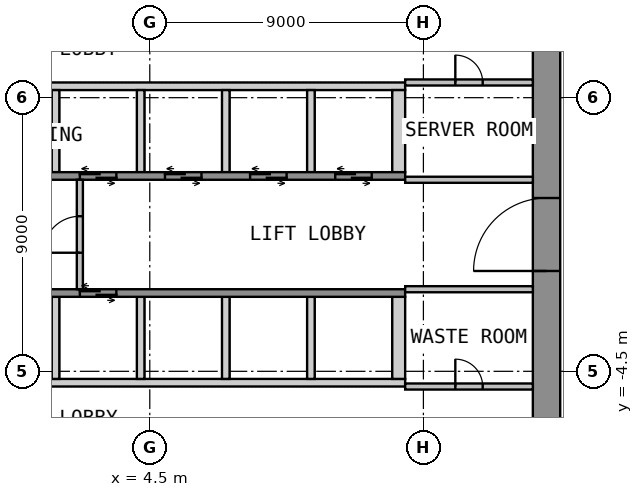
"""IFC4 building model, lengths in metres.
Left out: names, types, materials, properties, quantities, classifications, styles, units other than length and angle.
Written with IfcOpenShell. Run it as: python <this file> out.ifc"""

import sys

from ifc_helpers import new_model, si_unit, direction, frame, frame_2d, origin, place, context, subcontext, project, spatial, polyline, rectangle, outline, extrude, element, fill, save


model = new_model("IFC4")
c1 = context("Model", 3, precision=1e-05, world=origin(), true_north=direction((0.0, 1.0)))
c2 = subcontext(c1, "Body", "Model", "MODEL_VIEW")
j1 = project(units=[si_unit("LENGTHUNIT", "METRE"), si_unit("PLANEANGLEUNIT", "RADIAN")], contexts=[c1])
p1 = place(None, origin())
s1 = spatial("IfcSite", under=j1, at=p1, CompositionType="ELEMENT")
p2 = place(p1, origin())
s2 = spatial("IfcBuilding", under=s1, at=p2, CompositionType="ELEMENT")
p3 = place(p2, frame((0.0, 0.0, 10.8)))
s3 = spatial("IfcBuildingStorey", under=s2, at=p3, CompositionType="ELEMENT", Elevation=10.8)
p4 = place(p3, frame((17.55, -12.6, 0.0), z_axis=(0.0, 0.0, 1.0), x_axis=(0.0, 1.0, 0.0)))
e1 = element("IfcWall", 1, at=p4, inside=s3, PredefinedType="SHEAR", context=c2, shape_type="SweptSolid", body=[
    extrude(rectangle(XDim=25.2, YDim=0.9, at=frame_2d((12.6, 0.0))), origin(), (0.0, 0.0, 1.0), 4.4),
])
p5 = place(p4, frame((11.4, 0.0, 0.0)))
e2 = element("IfcOpeningElement", 2, at=p5, cuts=e1, PredefinedType="OPENING", context=c2, shape_type="SweptSolid", body=[
    extrude(rectangle(XDim=2.4, YDim=2.1, at=frame_2d((1.2, 1.05))), frame((0.0, 0.46, 0.0), z_axis=(0.0, -1.0, 0.0), x_axis=(1.0, 0.0, 0.0)), (0.0, 0.0, 1.0), 0.92),
])
p6 = place(p3, origin())
e3 = element("IfcWall", 3, at=p6, inside=s3, PredefinedType="SHEAR", context=c2, shape_type="SweptSolid", body=[
    extrude(outline(polyline([(-12.9, 4.75), (12.9, 4.75), (12.9, 5.0), (-12.9, 5.0), (-12.9, 4.75)])), origin(), (0.0, 0.0, 1.0), 4.4),
])
p7 = place(p3, origin())
e4 = element("IfcWall", 4, at=p7, inside=s3, PredefinedType="SHEAR", context=c2, shape_type="SweptSolid", body=[
    extrude(outline(polyline([(1.275, 2.05), (1.525, 2.05), (1.525, 4.75), (1.275, 4.75), (1.275, 2.05)])), origin(), (0.0, 0.0, 1.0), 4.4),
])
p8 = place(p3, origin())
e5 = element("IfcWall", 5, at=p8, inside=s3, PredefinedType="SHEAR", context=c2, shape_type="SweptSolid", body=[
    extrude(outline(polyline([(4.075, 2.05), (4.325, 2.05), (4.325, 4.75), (4.075, 4.75), (4.075, 2.05)])), origin(), (0.0, 0.0, 1.0), 4.4),
])
p9 = place(p3, origin())
e6 = element("IfcWall", 6, at=p9, inside=s3, PredefinedType="SHEAR", context=c2, shape_type="SweptSolid", body=[
    extrude(outline(polyline([(6.875, 2.05), (7.125, 2.05), (7.125, 4.75), (6.875, 4.75), (6.875, 2.05)])), origin(), (0.0, 0.0, 1.0), 4.4),
])
p10 = place(p3, origin())
e7 = element("IfcWall", 7, at=p10, inside=s3, PredefinedType="SHEAR", context=c2, shape_type="SweptSolid", body=[
    extrude(outline(polyline([(9.675, 2.05), (9.925, 2.05), (9.925, 4.75), (9.675, 4.75), (9.675, 2.05)])), origin(), (0.0, 0.0, 1.0), 4.4),
])
p11 = place(p3, origin())
e8 = element("IfcWall", 8, at=p11, inside=s3, PredefinedType="SHEAR", context=c2, shape_type="SweptSolid", body=[
    extrude(outline(polyline([(12.475, 2.05), (12.9, 2.05), (12.9, 4.75), (12.475, 4.75), (12.475, 2.05)])), origin(), (0.0, 0.0, 1.0), 4.4),
])
p12 = place(p3, frame((-12.9, 1.925, 0.0), z_axis=(0.0, 0.0, 1.0), x_axis=(1.0, 0.0, 0.0)))
e9 = element("IfcWall", 9, at=p12, inside=s3, PredefinedType="SHEAR", context=c2, shape_type="SweptSolid", body=[
    extrude(rectangle(XDim=25.8, YDim=0.25, at=frame_2d((12.9, 0.0))), origin(), (0.0, 0.0, 1.0), 4.4),
])
p13 = place(p12, frame((9.5, 0.0, 0.0)))
e10 = element("IfcOpeningElement", 10, at=p13, cuts=e9, PredefinedType="OPENING", context=c2, shape_type="SweptSolid", body=[
    extrude(rectangle(XDim=1.2, YDim=2.1, at=frame_2d((0.6, 1.05))), frame((0.0, 0.135, 0.0), z_axis=(0.0, -1.0, 0.0), x_axis=(1.0, 0.0, 0.0)), (0.0, 0.0, 1.0), 0.27),
])
p14 = place(p12, frame((12.3, 0.0, 0.0)))
e11 = element("IfcOpeningElement", 11, at=p14, cuts=e9, PredefinedType="OPENING", context=c2, shape_type="SweptSolid", body=[
    extrude(rectangle(XDim=1.2, YDim=2.1, at=frame_2d((0.6, 1.05))), frame((0.0, 0.135, 0.0), z_axis=(0.0, -1.0, 0.0), x_axis=(1.0, 0.0, 0.0)), (0.0, 0.0, 1.0), 0.27),
])
p15 = place(p12, frame((15.1, 0.0, 0.0)))
e12 = element("IfcOpeningElement", 12, at=p15, cuts=e9, PredefinedType="OPENING", context=c2, shape_type="SweptSolid", body=[
    extrude(rectangle(XDim=1.2, YDim=2.1, at=frame_2d((0.6, 1.05))), frame((0.0, 0.135, 0.0), z_axis=(0.0, -1.0, 0.0), x_axis=(1.0, 0.0, 0.0)), (0.0, 0.0, 1.0), 0.27),
])
p16 = place(p12, frame((17.9, 0.0, 0.0)))
e13 = element("IfcOpeningElement", 13, at=p16, cuts=e9, PredefinedType="OPENING", context=c2, shape_type="SweptSolid", body=[
    extrude(rectangle(XDim=1.2, YDim=2.1, at=frame_2d((0.6, 1.05))), frame((0.0, 0.135, 0.0), z_axis=(0.0, -1.0, 0.0), x_axis=(1.0, 0.0, 0.0)), (0.0, 0.0, 1.0), 0.27),
])
p17 = place(p12, frame((20.7, 0.0, 0.0)))
e14 = element("IfcOpeningElement", 14, at=p17, cuts=e9, PredefinedType="OPENING", context=c2, shape_type="SweptSolid", body=[
    extrude(rectangle(XDim=1.2, YDim=2.1, at=frame_2d((0.6, 1.05))), frame((0.0, 0.135, 0.0), z_axis=(0.0, -1.0, 0.0), x_axis=(1.0, 0.0, 0.0)), (0.0, 0.0, 1.0), 0.27),
])
p18 = place(p12, frame((23.5, 0.0, 0.0)))
e15 = element("IfcOpeningElement", 15, at=p18, cuts=e9, PredefinedType="OPENING", context=c2, shape_type="SweptSolid", body=[
    extrude(rectangle(XDim=1.2, YDim=2.1, at=frame_2d((0.6, 1.05))), frame((0.0, 0.135, 0.0), z_axis=(0.0, -1.0, 0.0), x_axis=(1.0, 0.0, 0.0)), (0.0, 0.0, 1.0), 0.27),
])
p19 = place(p3, origin())
e16 = element("IfcWall", 16, at=p19, inside=s3, PredefinedType="SHEAR", context=c2, shape_type="SweptSolid", body=[
    extrude(outline(polyline([(-12.9, -5.0), (12.9, -5.0), (12.9, -4.75), (-12.9, -4.75), (-12.9, -5.0)])), origin(), (0.0, 0.0, 1.0), 4.4),
])
p20 = place(p3, origin())
e17 = element("IfcWall", 17, at=p20, inside=s3, PredefinedType="SHEAR", context=c2, shape_type="SweptSolid", body=[
    extrude(outline(polyline([(1.275, -4.75), (1.525, -4.75), (1.525, -2.05), (1.275, -2.05), (1.275, -4.75)])), origin(), (0.0, 0.0, 1.0), 4.4),
])
p21 = place(p3, origin())
e18 = element("IfcWall", 18, at=p21, inside=s3, PredefinedType="SHEAR", context=c2, shape_type="SweptSolid", body=[
    extrude(outline(polyline([(4.075, -4.75), (4.325, -4.75), (4.325, -2.05), (4.075, -2.05), (4.075, -4.75)])), origin(), (0.0, 0.0, 1.0), 4.4),
])
p22 = place(p3, origin())
e19 = element("IfcWall", 19, at=p22, inside=s3, PredefinedType="SHEAR", context=c2, shape_type="SweptSolid", body=[
    extrude(outline(polyline([(6.875, -4.75), (7.125, -4.75), (7.125, -2.05), (6.875, -2.05), (6.875, -4.75)])), origin(), (0.0, 0.0, 1.0), 4.4),
])
p23 = place(p3, origin())
e20 = element("IfcWall", 20, at=p23, inside=s3, PredefinedType="SHEAR", context=c2, shape_type="SweptSolid", body=[
    extrude(outline(polyline([(9.675, -4.75), (9.925, -4.75), (9.925, -2.05), (9.675, -2.05), (9.675, -4.75)])), origin(), (0.0, 0.0, 1.0), 4.4),
])
p24 = place(p3, origin())
e21 = element("IfcWall", 21, at=p24, inside=s3, PredefinedType="SHEAR", context=c2, shape_type="SweptSolid", body=[
    extrude(outline(polyline([(12.475, -4.75), (12.9, -4.75), (12.9, -2.05), (12.475, -2.05), (12.475, -4.75)])), origin(), (0.0, 0.0, 1.0), 4.4),
])
p25 = place(p3, frame((-12.9, -1.925, 0.0), z_axis=(0.0, 0.0, 1.0), x_axis=(1.0, 0.0, 0.0)))
e22 = element("IfcWall", 22, at=p25, inside=s3, PredefinedType="SHEAR", context=c2, shape_type="SweptSolid", body=[
    extrude(rectangle(XDim=25.8, YDim=0.25, at=frame_2d((12.9, 0.0))), origin(), (0.0, 0.0, 1.0), 4.4),
])
p26 = place(p25, frame((1.1, 0.0, 0.0)))
e23 = element("IfcOpeningElement", 23, at=p26, cuts=e22, PredefinedType="OPENING", context=c2, shape_type="SweptSolid", body=[
    extrude(rectangle(XDim=1.2, YDim=2.1, at=frame_2d((0.6, 1.05))), frame((0.0, 0.135, 0.0), z_axis=(0.0, -1.0, 0.0), x_axis=(1.0, 0.0, 0.0)), (0.0, 0.0, 1.0), 0.27),
])
p27 = place(p25, frame((3.9, 0.0, 0.0)))
e24 = element("IfcOpeningElement", 24, at=p27, cuts=e22, PredefinedType="OPENING", context=c2, shape_type="SweptSolid", body=[
    extrude(rectangle(XDim=1.2, YDim=2.1, at=frame_2d((0.6, 1.05))), frame((0.0, 0.135, 0.0), z_axis=(0.0, -1.0, 0.0), x_axis=(1.0, 0.0, 0.0)), (0.0, 0.0, 1.0), 0.27),
])
p28 = place(p25, frame((6.7, 0.0, 0.0)))
e25 = element("IfcOpeningElement", 25, at=p28, cuts=e22, PredefinedType="OPENING", context=c2, shape_type="SweptSolid", body=[
    extrude(rectangle(XDim=1.2, YDim=2.1, at=frame_2d((0.6, 1.05))), frame((0.0, 0.135, 0.0), z_axis=(0.0, -1.0, 0.0), x_axis=(1.0, 0.0, 0.0)), (0.0, 0.0, 1.0), 0.27),
])
p29 = place(p25, frame((9.5, 0.0, 0.0)))
e26 = element("IfcOpeningElement", 26, at=p29, cuts=e22, PredefinedType="OPENING", context=c2, shape_type="SweptSolid", body=[
    extrude(rectangle(XDim=1.2, YDim=2.1, at=frame_2d((0.6, 1.05))), frame((0.0, 0.135, 0.0), z_axis=(0.0, -1.0, 0.0), x_axis=(1.0, 0.0, 0.0)), (0.0, 0.0, 1.0), 0.27),
])
p30 = place(p25, frame((12.3, 0.0, 0.0)))
e27 = element("IfcOpeningElement", 27, at=p30, cuts=e22, PredefinedType="OPENING", context=c2, shape_type="SweptSolid", body=[
    extrude(rectangle(XDim=1.2, YDim=2.1, at=frame_2d((0.6, 1.05))), frame((0.0, 0.135, 0.0), z_axis=(0.0, -1.0, 0.0), x_axis=(1.0, 0.0, 0.0)), (0.0, 0.0, 1.0), 0.27),
])
p31 = place(p25, frame((15.1, 0.0, 0.0)))
e28 = element("IfcOpeningElement", 28, at=p31, cuts=e22, PredefinedType="OPENING", context=c2, shape_type="SweptSolid", body=[
    extrude(rectangle(XDim=1.2, YDim=2.1, at=frame_2d((0.6, 1.05))), frame((0.0, 0.135, 0.0), z_axis=(0.0, -1.0, 0.0), x_axis=(1.0, 0.0, 0.0)), (0.0, 0.0, 1.0), 0.27),
])
p32 = place(p3, frame((2.2, -1.8, 0.0), z_axis=(0.0, 0.0, 1.0), x_axis=(0.0, 1.0, 0.0)))
e29 = element("IfcWall", 29, at=p32, inside=s3, PredefinedType="PARTITIONING", context=c2, shape_type="SweptSolid", body=[
    extrude(rectangle(XDim=3.6, YDim=0.2, at=frame_2d((1.8, 0.0))), origin(), (0.0, 0.0, 1.0), 4.4),
])
p33 = place(p32, frame((1.2, 0.0, 0.0)))
e30 = element("IfcOpeningElement", 30, at=p33, cuts=e29, PredefinedType="OPENING", context=c2, shape_type="SweptSolid", body=[
    extrude(rectangle(XDim=1.2, YDim=2.1, at=frame_2d((0.6, 1.05))), frame((0.0, 0.11, 0.0), z_axis=(0.0, -1.0, 0.0), x_axis=(1.0, 0.0, 0.0)), (0.0, 0.0, 1.0), 0.22),
])
p34 = place(p3, frame((12.9, 5.0, 0.0), z_axis=(0.0, 0.0, 1.0), x_axis=(1.0, 0.0, 0.0)))
e31 = element("IfcWall", 31, at=p34, inside=s3, PredefinedType="PARTITIONING", context=c2, shape_type="SweptSolid", body=[
    extrude(rectangle(XDim=4.2, YDim=0.2, at=frame_2d((2.1, 0.0))), origin(), (0.0, 0.0, 1.0), 4.4),
])
p35 = place(p34, frame((1.65, 0.0, 0.0)))
e32 = element("IfcOpeningElement", 32, at=p35, cuts=e31, PredefinedType="OPENING", context=c2, shape_type="SweptSolid", body=[
    extrude(rectangle(XDim=0.9, YDim=2.1, at=frame_2d((0.45, 1.05))), frame((0.0, 0.11, 0.0), z_axis=(0.0, -1.0, 0.0), x_axis=(1.0, 0.0, 0.0)), (0.0, 0.0, 1.0), 0.22),
])
p36 = place(p3, frame((12.9, 1.8, 0.0), z_axis=(0.0, 0.0, 1.0), x_axis=(1.0, 0.0, 0.0)))
e33 = element("IfcWall", 33, at=p36, inside=s3, PredefinedType="PARTITIONING", context=c2, shape_type="SweptSolid", body=[
    extrude(rectangle(XDim=4.2, YDim=0.2, at=frame_2d((2.1, 0.0))), origin(), (0.0, 0.0, 1.0), 4.4),
])
p37 = place(p3, frame((12.9, -5.0, 0.0), z_axis=(0.0, 0.0, 1.0), x_axis=(1.0, 0.0, 0.0)))
e34 = element("IfcWall", 34, at=p37, inside=s3, PredefinedType="PARTITIONING", context=c2, shape_type="SweptSolid", body=[
    extrude(rectangle(XDim=4.2, YDim=0.2, at=frame_2d((2.1, 0.0))), origin(), (0.0, 0.0, 1.0), 4.4),
])
p38 = place(p37, frame((1.65, 0.0, 0.0)))
e35 = element("IfcOpeningElement", 35, at=p38, cuts=e34, PredefinedType="OPENING", context=c2, shape_type="SweptSolid", body=[
    extrude(rectangle(XDim=0.9, YDim=2.1, at=frame_2d((0.45, 1.05))), frame((0.0, 0.11, 0.0), z_axis=(0.0, -1.0, 0.0), x_axis=(1.0, 0.0, 0.0)), (0.0, 0.0, 1.0), 0.22),
])
p39 = place(p3, frame((12.9, -1.8, 0.0), z_axis=(0.0, 0.0, 1.0), x_axis=(1.0, 0.0, 0.0)))
e36 = element("IfcWall", 36, at=p39, inside=s3, PredefinedType="PARTITIONING", context=c2, shape_type="SweptSolid", body=[
    extrude(rectangle(XDim=4.2, YDim=0.2, at=frame_2d((2.1, 0.0))), origin(), (0.0, 0.0, 1.0), 4.4),
])
p40 = place(p5, origin())
e37 = element("IfcDoor", 37, at=p40, inside=s3, OperationType="DOUBLE_DOOR_DOUBLE_SWING", PredefinedType="DOOR", context=c2, shape_type="SweptSolid", body=[
    extrude(rectangle(XDim=2.4, YDim=2.1, at=frame_2d((1.2, 1.05))), frame((0.0, 0.025, 0.0), z_axis=(0.0, -1.0, 0.0), x_axis=(1.0, 0.0, 0.0)), (0.0, 0.0, 1.0), 0.05),
])
fill(e2, e37)
p41 = place(p15, origin())
e38 = element("IfcDoor", 38, at=p41, inside=s3, OperationType="DOUBLE_DOOR_SLIDING", PredefinedType="DOOR", context=c2, shape_type="SweptSolid", body=[
    extrude(rectangle(XDim=1.2, YDim=2.1, at=frame_2d((0.6, 1.05))), frame((0.0, 0.025, 0.0), z_axis=(0.0, -1.0, 0.0), x_axis=(1.0, 0.0, 0.0)), (0.0, 0.0, 1.0), 0.05),
])
fill(e12, e38)
p42 = place(p16, origin())
e39 = element("IfcDoor", 39, at=p42, inside=s3, OperationType="DOUBLE_DOOR_SLIDING", PredefinedType="DOOR", context=c2, shape_type="SweptSolid", body=[
    extrude(rectangle(XDim=1.2, YDim=2.1, at=frame_2d((0.6, 1.05))), frame((0.0, 0.025, 0.0), z_axis=(0.0, -1.0, 0.0), x_axis=(1.0, 0.0, 0.0)), (0.0, 0.0, 1.0), 0.05),
])
fill(e13, e39)
p43 = place(p17, origin())
e40 = element("IfcDoor", 40, at=p43, inside=s3, OperationType="DOUBLE_DOOR_SLIDING", PredefinedType="DOOR", context=c2, shape_type="SweptSolid", body=[
    extrude(rectangle(XDim=1.2, YDim=2.1, at=frame_2d((0.6, 1.05))), frame((0.0, 0.025, 0.0), z_axis=(0.0, -1.0, 0.0), x_axis=(1.0, 0.0, 0.0)), (0.0, 0.0, 1.0), 0.05),
])
fill(e14, e40)
p44 = place(p18, origin())
e41 = element("IfcDoor", 41, at=p44, inside=s3, OperationType="DOUBLE_DOOR_SLIDING", PredefinedType="DOOR", context=c2, shape_type="SweptSolid", body=[
    extrude(rectangle(XDim=1.2, YDim=2.1, at=frame_2d((0.6, 1.05))), frame((0.0, 0.025, 0.0), z_axis=(0.0, -1.0, 0.0), x_axis=(1.0, 0.0, 0.0)), (0.0, 0.0, 1.0), 0.05),
])
fill(e15, e41)
p45 = place(p31, origin())
e42 = element("IfcDoor", 42, at=p45, inside=s3, OperationType="DOUBLE_DOOR_SLIDING", PredefinedType="DOOR", context=c2, shape_type="SweptSolid", body=[
    extrude(rectangle(XDim=1.2, YDim=2.1, at=frame_2d((0.6, 1.05))), frame((0.0, 0.025, 0.0), z_axis=(0.0, -1.0, 0.0), x_axis=(1.0, 0.0, 0.0)), (0.0, 0.0, 1.0), 0.05),
])
fill(e28, e42)
p46 = place(p33, origin())
e43 = element("IfcDoor", 43, at=p46, inside=s3, OperationType="SINGLE_SWING_LEFT", PredefinedType="DOOR", context=c2, shape_type="SweptSolid", body=[
    extrude(rectangle(XDim=1.2, YDim=2.1, at=frame_2d((0.6, 1.05))), frame((0.0, 0.025, 0.0), z_axis=(0.0, -1.0, 0.0), x_axis=(1.0, 0.0, 0.0)), (0.0, 0.0, 1.0), 0.05),
])
fill(e30, e43)
p47 = place(p35, origin())
e44 = element("IfcDoor", 44, at=p47, inside=s3, OperationType="SINGLE_SWING_LEFT", PredefinedType="DOOR", context=c2, shape_type="SweptSolid", body=[
    extrude(rectangle(XDim=0.9, YDim=2.1, at=frame_2d((0.45, 1.05))), frame((0.0, 0.025, 0.0), z_axis=(0.0, -1.0, 0.0), x_axis=(1.0, 0.0, 0.0)), (0.0, 0.0, 1.0), 0.05),
])
fill(e32, e44)
p48 = place(p38, origin())
e45 = element("IfcDoor", 45, at=p48, inside=s3, OperationType="SINGLE_SWING_LEFT", PredefinedType="DOOR", context=c2, shape_type="SweptSolid", body=[
    extrude(rectangle(XDim=0.9, YDim=2.1, at=frame_2d((0.45, 1.05))), frame((0.0, 0.025, 0.0), z_axis=(0.0, -1.0, 0.0), x_axis=(1.0, 0.0, 0.0)), (0.0, 0.0, 1.0), 0.05),
])
fill(e35, e45)
save(model, sys.argv[1])
